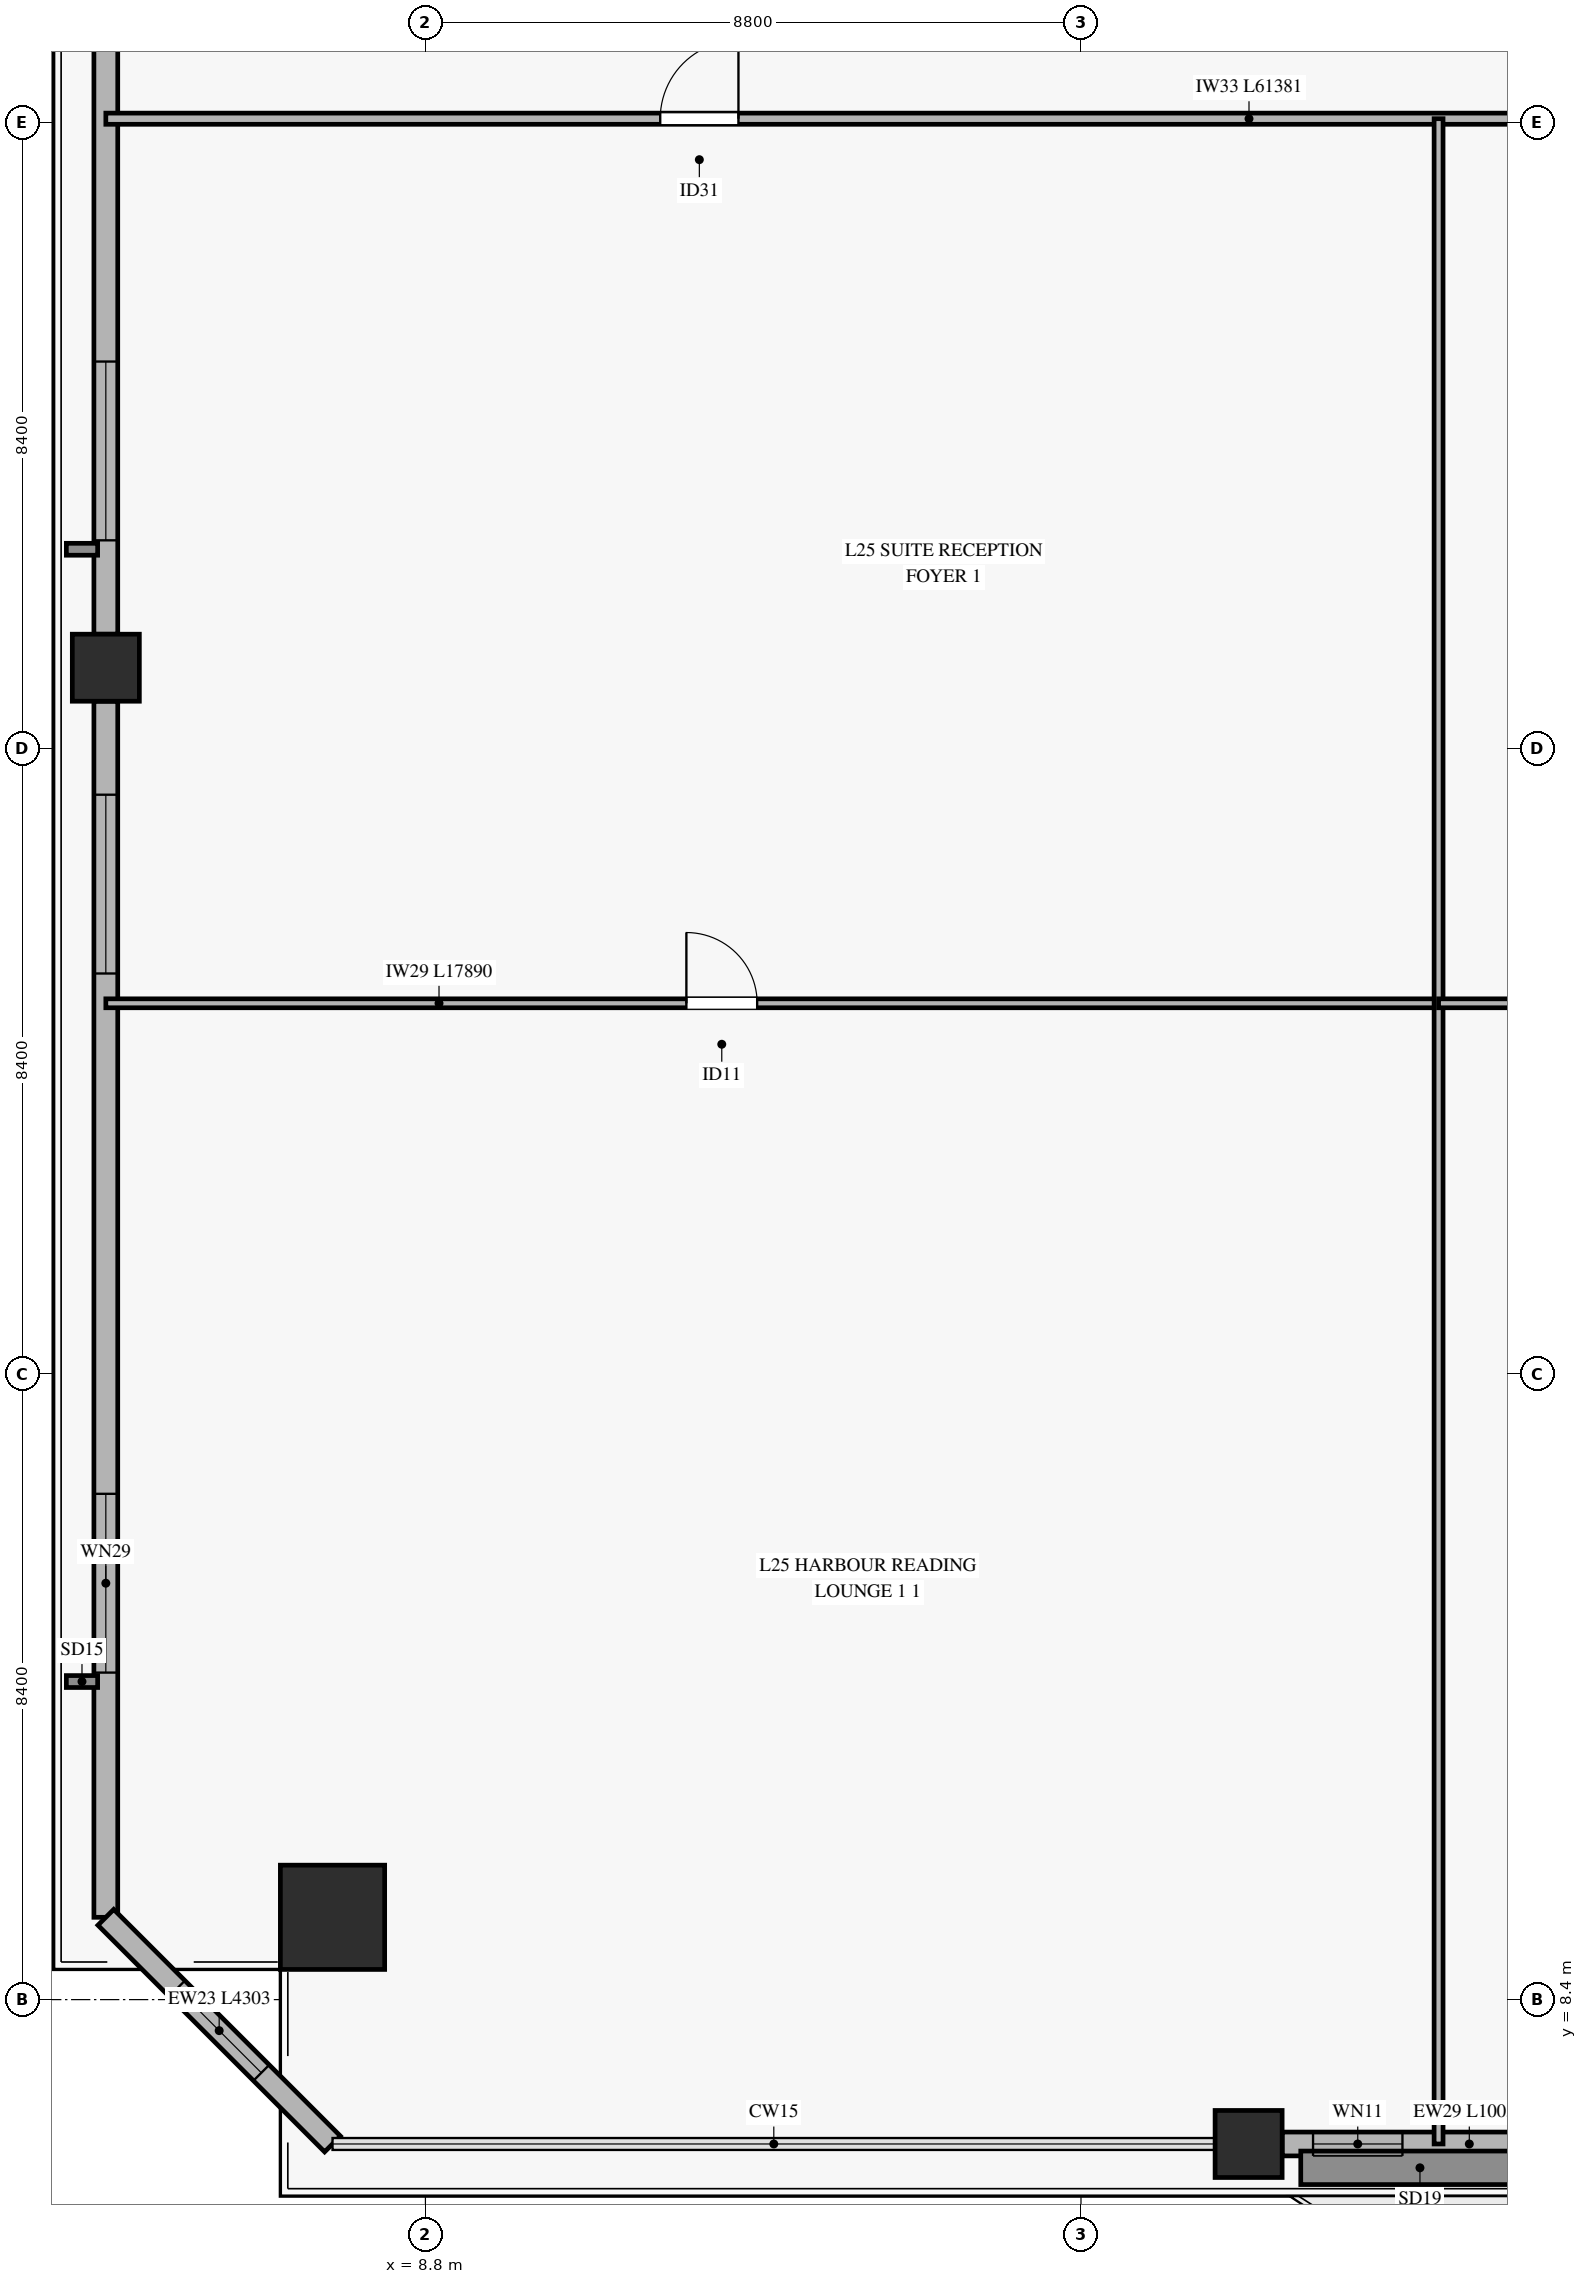
"""IFC4 building model, lengths in metres.
Left out: names, types, materials, properties, quantities, classifications, styles, units other than length and angle.
Written with IfcOpenShell. Run it as: python <this file> out.ifc"""

import sys

from ifc_helpers import new_model, si_unit, direction, frame, frame_2d, origin, origin_2d, place, context, subcontext, project, spatial, rectangle, hollow_rectangle, extrude, source, transform, mapped, element, fill, save


model = new_model("IFC4")
c1 = context("Model", 3, precision=1e-05, world=origin(), true_north=direction((0.0, 1.0)))
c2 = subcontext(c1, "Body", "Model", "MODEL_VIEW")
j1 = project(units=[si_unit("LENGTHUNIT", "METRE"), si_unit("PLANEANGLEUNIT", "RADIAN")], contexts=[c1])
p1 = place(None, origin())
s1 = spatial("IfcSite", under=j1, at=p1, CompositionType="ELEMENT")
p2 = place(p1, origin())
s2 = spatial("IfcBuilding", under=s1, at=p2, CompositionType="ELEMENT")
p3 = place(p2, frame((0.0, 0.0, 103.6)))
s3 = spatial("IfcBuildingStorey", under=s2, at=p3, CompositionType="ELEMENT", Elevation=103.6)
m1 = source(origin(), c2, "Body", "SweptSolid", [
    extrude(hollow_rectangle(XDim=1.4, YDim=1.4, WallThickness=0.065, at=origin_2d()), origin(), (0.0, 0.0, 1.0), 3.68),
])
p4 = place(p3, frame((7.553, 9.505, 0.0), z_axis=(0.0, 0.0, 1.0), x_axis=(1.0, 0.0, 0.0)))
e1 = element("IfcColumn", 1, at=p4, inside=s3, PredefinedType="COLUMN", context=c2, shape_type="MappedRepresentation", body=[
    mapped(m1, transform((0.0, 0.0, 0.0), x_axis=(1.0, 0.0, 0.0), y_axis=(0.0, 1.0, 0.0), z_axis=(0.0, 0.0, 1.0), scale=1.0)),
])
m2 = source(origin(), c2, "Body", "SweptSolid", [
    extrude(hollow_rectangle(XDim=0.9, YDim=0.9, WallThickness=0.04, at=origin_2d()), origin(), (0.0, 0.0, 1.0), 3.68),
])
for number, where, z_axis, x_axis in (
    (2, (19.85, 6.462, 0.0), (0.0, 0.0, 1.0), (1.0, 0.0, 0.0)),
    (3, (4.51, 26.28, 0.0), (0.0, 0.0, 1.0), (1.0, 0.0, 0.0)),
):
    element("IfcColumn", number, at=place(p3, frame(where, z_axis=z_axis, x_axis=x_axis)), inside=s3, PredefinedType="COLUMN", context=c2, shape_type="MappedRepresentation", body=[
        mapped(m2, transform((0.0, 0.0, 0.0), x_axis=(1.0, 0.0, 0.0), y_axis=(0.0, 1.0, 0.0), z_axis=(0.0, 0.0, 1.0), scale=1.0)),
    ])
p5 = place(p3, frame((20.3, 6.462, 0.0), z_axis=(0.0, 0.0, 1.0), x_axis=(1.0, 0.0, 0.0)))
e4 = element("IfcWall", 4, at=p5, inside=s3, PredefinedType="SOLIDWALL", context=c2, shape_type="SweptSolid", body=[
    extrude(rectangle(XDim=10.05, YDim=0.32, at=frame_2d((5.025, 0.0))), origin(), (0.0, 0.0, 1.0), 3.16),
])
p6 = place(p5, frame((4.1, 0.0, 0.0)))
e5 = element("IfcOpeningElement", 5, at=p6, cuts=e4, PredefinedType="OPENING", context=c2, shape_type="SweptSolid", body=[
    extrude(rectangle(XDim=1.8, YDim=2.25, at=frame_2d((0.9, 1.125))), frame((0.0, 0.17, 0.0), z_axis=(0.0, -1.0, 0.0), x_axis=(1.0, 0.0, 0.0)), (0.0, 0.0, 1.0), 0.34),
])
p7 = place(p5, frame((0.415, 0.0, 0.45)))
e6 = element("IfcOpeningElement", 6, at=p7, cuts=e4, PredefinedType="OPENING", context=c2, shape_type="SweptSolid", body=[
    extrude(rectangle(XDim=1.2, YDim=2.0, at=frame_2d((0.6, 1.0))), frame((0.0, 0.17, 0.0), z_axis=(0.0, -1.0, 0.0), x_axis=(1.0, 0.0, 0.0)), (0.0, 0.0, 1.0), 0.34),
])
p8 = place(p5, frame((6.9, 0.0, 0.45)))
e7 = element("IfcOpeningElement", 7, at=p8, cuts=e4, PredefinedType="OPENING", context=c2, shape_type="SweptSolid", body=[
    extrude(rectangle(XDim=1.6, YDim=2.0, at=frame_2d((0.8, 1.0))), frame((0.0, 0.17, 0.0), z_axis=(0.0, -1.0, 0.0), x_axis=(1.0, 0.0, 0.0)), (0.0, 0.0, 1.0), 0.34),
])
p9 = place(p3, frame((4.51, 9.505, 0.0), z_axis=(0.0, 0.0, 1.0), x_axis=(0.0, 1.0, 0.0)))
e8 = element("IfcWall", 8, at=p9, inside=s3, PredefinedType="SOLIDWALL", context=c2, shape_type="SweptSolid", body=[
    extrude(rectangle(XDim=16.325, YDim=0.32, at=frame_2d((8.163, 0.0))), origin(), (0.0, 0.0, 1.0), 3.16),
])
p10 = place(p9, frame((3.285, 0.0, 0.45)))
e9 = element("IfcOpeningElement", 9, at=p10, cuts=e8, PredefinedType="OPENING", context=c2, shape_type="SweptSolid", body=[
    extrude(rectangle(XDim=2.4, YDim=2.1, at=frame_2d((1.2, 1.05))), frame((0.0, 0.17, 0.0), z_axis=(0.0, -1.0, 0.0), x_axis=(1.0, 0.0, 0.0)), (0.0, 0.0, 1.0), 0.34),
])
p11 = place(p9, frame((12.67, 0.0, 0.45)))
e10 = element("IfcOpeningElement", 10, at=p11, cuts=e8, PredefinedType="OPENING", context=c2, shape_type="SweptSolid", body=[
    extrude(rectangle(XDim=2.4, YDim=2.1, at=frame_2d((1.2, 1.05))), frame((0.0, 0.17, 0.0), z_axis=(0.0, -1.0, 0.0), x_axis=(1.0, 0.0, 0.0)), (0.0, 0.0, 1.0), 0.34),
])
p12 = place(p3, frame((4.51, 26.73, 0.0), z_axis=(0.0, 0.0, 1.0), x_axis=(0.0, 1.0, 0.0)))
e11 = element("IfcWall", 11, at=p12, inside=s3, PredefinedType="SOLIDWALL", context=c2, shape_type="SweptSolid", body=[
    extrude(rectangle(XDim=16.326, YDim=0.32, at=frame_2d((8.163, 0.0))), origin(), (0.0, 0.0, 1.0), 3.16),
])
p13 = place(p12, frame((1.26, 0.0, 0.45)))
e12 = element("IfcOpeningElement", 12, at=p13, cuts=e11, PredefinedType="OPENING", context=c2, shape_type="SweptSolid", body=[
    extrude(rectangle(XDim=2.4, YDim=2.1, at=frame_2d((1.2, 1.05))), frame((0.0, 0.17, 0.0), z_axis=(0.0, -1.0, 0.0), x_axis=(1.0, 0.0, 0.0)), (0.0, 0.0, 1.0), 0.34),
])
p14 = place(p12, frame((12.574, 0.0, 0.45)))
e13 = element("IfcOpeningElement", 13, at=p14, cuts=e11, PredefinedType="OPENING", context=c2, shape_type="SweptSolid", body=[
    extrude(rectangle(XDim=2.4, YDim=2.1, at=frame_2d((1.2, 1.05))), frame((0.0, 0.17, 0.0), z_axis=(0.0, -1.0, 0.0), x_axis=(1.0, 0.0, 0.0)), (0.0, 0.0, 1.0), 0.34),
])
p15 = place(p3, frame((4.51, 9.505, 0.0), z_axis=(0.0, 0.0, 1.0), x_axis=(0.707106781187, -0.707106781187, 0.0)))
e14 = element("IfcWall", 14, at=p15, inside=s3, PredefinedType="SOLIDWALL", context=c2, shape_type="SweptSolid", body=[
    extrude(rectangle(XDim=4.303, YDim=0.3, at=frame_2d((2.152, 0.0))), origin(), (0.0, 0.0, 1.0), 3.16),
])
p16 = place(p15, frame((1.352, 0.0, 0.45)))
e15 = element("IfcOpeningElement", 15, at=p16, cuts=e14, PredefinedType="OPENING", context=c2, shape_type="SweptSolid", body=[
    extrude(rectangle(XDim=1.6, YDim=2.0, at=frame_2d((0.8, 1.0))), frame((0.0, 0.16, 0.0), z_axis=(0.0, -1.0, 0.0), x_axis=(1.0, 0.0, 0.0)), (0.0, 0.0, 1.0), 0.32),
])
p17 = place(p3, frame((4.51, 33.65, 0.0), z_axis=(0.0, 0.0, 1.0), x_axis=(1.0, 0.0, 0.0)))
e16 = element("IfcWall", 16, at=p17, inside=s3, PredefinedType="PARTITIONING", context=c2, shape_type="SweptSolid", body=[
    extrude(rectangle(XDim=61.381, YDim=0.15, at=frame_2d((30.69, 0.0))), origin(), (0.0, 0.0, 1.0), 2.765),
])
p18 = place(p17, frame((7.442, 0.0, 0.0)))
e17 = element("IfcOpeningElement", 17, at=p18, cuts=e16, PredefinedType="OPENING", context=c2, shape_type="SweptSolid", body=[
    extrude(rectangle(XDim=1.05, YDim=2.15, at=frame_2d((0.525, 1.075))), frame((0.0, 0.085, 0.0), z_axis=(0.0, -1.0, 0.0), x_axis=(1.0, 0.0, 0.0)), (0.0, 0.0, 1.0), 0.17),
])
p19 = place(p17, frame((20.776, 0.0, 0.0)))
e18 = element("IfcOpeningElement", 18, at=p19, cuts=e16, PredefinedType="OPENING", context=c2, shape_type="SweptSolid", body=[
    extrude(rectangle(XDim=1.05, YDim=2.15, at=frame_2d((0.525, 1.075))), frame((0.0, 0.085, 0.0), z_axis=(0.0, -1.0, 0.0), x_axis=(1.0, 0.0, 0.0)), (0.0, 0.0, 1.0), 0.17),
])
p20 = place(p17, frame((30.061, 0.0, 0.0)))
e19 = element("IfcOpeningElement", 19, at=p20, cuts=e16, PredefinedType="OPENING", context=c2, shape_type="SweptSolid", body=[
    extrude(rectangle(XDim=1.05, YDim=2.15, at=frame_2d((0.525, 1.075))), frame((0.0, 0.085, 0.0), z_axis=(0.0, -1.0, 0.0), x_axis=(1.0, 0.0, 0.0)), (0.0, 0.0, 1.0), 0.17),
])
p21 = place(p17, frame((47.371, 0.0, 0.0)))
e20 = element("IfcOpeningElement", 20, at=p21, cuts=e16, PredefinedType="OPENING", context=c2, shape_type="SweptSolid", body=[
    extrude(rectangle(XDim=1.05, YDim=2.15, at=frame_2d((0.525, 1.075))), frame((0.0, 0.085, 0.0), z_axis=(0.0, -1.0, 0.0), x_axis=(1.0, 0.0, 0.0)), (0.0, 0.0, 1.0), 0.17),
])
p22 = place(p3, frame((4.51, 21.775, 0.0), z_axis=(0.0, 0.0, 1.0), x_axis=(1.0, 0.0, 0.0)))
e21 = element("IfcWall", 21, at=p22, inside=s3, PredefinedType="PARTITIONING", context=c2, shape_type="SweptSolid", body=[
    extrude(rectangle(XDim=17.89, YDim=0.12, at=frame_2d((8.945, 0.0))), origin(), (0.0, 0.0, 1.0), 2.765),
])
p23 = place(p22, frame((7.793, 0.0, 0.0)))
e22 = element("IfcOpeningElement", 22, at=p23, cuts=e21, PredefinedType="OPENING", context=c2, shape_type="SweptSolid", body=[
    extrude(rectangle(XDim=0.95, YDim=2.1, at=frame_2d((0.475, 1.05))), frame((0.0, 0.07, 0.0), z_axis=(0.0, -1.0, 0.0), x_axis=(1.0, 0.0, 0.0)), (0.0, 0.0, 1.0), 0.14),
])
p24 = place(p3, frame((22.4, 6.462, 0.0), z_axis=(0.0, 0.0, 1.0), x_axis=(0.0, 1.0, 0.0)))
e23 = element("IfcWall", 23, at=p24, inside=s3, PredefinedType="PARTITIONING", context=c2, shape_type="SweptSolid", body=[
    extrude(rectangle(XDim=27.188, YDim=0.12, at=frame_2d((13.594, 0.0))), origin(), (0.0, 0.0, 1.0), 3.165),
])
p25 = place(p3, frame((22.4, 21.775, 0.0), z_axis=(0.0, 0.0, 1.0), x_axis=(1.0, 0.0, 0.0)))
e24 = element("IfcWall", 24, at=p25, inside=s3, PredefinedType="PARTITIONING", context=c2, shape_type="SweptSolid", body=[
    extrude(rectangle(XDim=6.8, YDim=0.12, at=frame_2d((3.4, 0.0))), origin(), (0.0, 0.0, 1.0), 3.215),
])
p26 = place(p25, frame((3.019, 0.0, 0.0)))
e25 = element("IfcOpeningElement", 25, at=p26, cuts=e24, PredefinedType="OPENING", context=c2, shape_type="SweptSolid", body=[
    extrude(rectangle(XDim=0.95, YDim=2.1, at=frame_2d((0.475, 1.05))), frame((0.0, 0.07, 0.0), z_axis=(0.0, -1.0, 0.0), x_axis=(1.0, 0.0, 0.0)), (0.0, 0.0, 1.0), 0.14),
])
m3 = source(origin(), c2, "Body", "SweptSolid", [
    extrude(rectangle(XDim=1.2, YDim=2.0, at=frame_2d((0.6, 1.0))), frame((0.0, 0.03, 0.0), z_axis=(0.0, -1.0, 0.0), x_axis=(1.0, 0.0, 0.0)), (0.0, 0.0, 1.0), 0.06),
])
p27 = place(p7, origin())
e26 = element("IfcWindow", 26, at=p27, inside=s3, PartitioningType="SINGLE_PANEL", PredefinedType="WINDOW", context=c2, shape_type="MappedRepresentation", body=[
    mapped(m3, transform((0.0, 0.0, 0.0), x_axis=(1.0, 0.0, 0.0), y_axis=(0.0, 1.0, 0.0), z_axis=(0.0, 0.0, 1.0), scale=1.0)),
])
fill(e6, e26)
m4 = source(origin(), c2, "Body", "SweptSolid", [
    extrude(rectangle(XDim=2.4, YDim=2.1, at=frame_2d((1.2, 1.05))), frame((0.0, 0.03, 0.0), z_axis=(0.0, -1.0, 0.0), x_axis=(1.0, 0.0, 0.0)), (0.0, 0.0, 1.0), 0.06),
])
p28 = place(p10, origin())
e27 = element("IfcWindow", 27, at=p28, inside=s3, PartitioningType="SINGLE_PANEL", PredefinedType="WINDOW", context=c2, shape_type="MappedRepresentation", body=[
    mapped(m4, transform((0.0, 0.0, 0.0), x_axis=(1.0, 0.0, 0.0), y_axis=(0.0, 1.0, 0.0), z_axis=(0.0, 0.0, 1.0), scale=1.0)),
])
fill(e9, e27)
p29 = place(p11, origin())
e28 = element("IfcWindow", 28, at=p29, inside=s3, PartitioningType="SINGLE_PANEL", PredefinedType="WINDOW", context=c2, shape_type="MappedRepresentation", body=[
    mapped(m4, transform((0.0, 0.0, 0.0), x_axis=(1.0, 0.0, 0.0), y_axis=(0.0, 1.0, 0.0), z_axis=(0.0, 0.0, 1.0), scale=1.0)),
])
fill(e10, e28)
p30 = place(p13, origin())
e29 = element("IfcWindow", 29, at=p30, inside=s3, PartitioningType="SINGLE_PANEL", PredefinedType="WINDOW", context=c2, shape_type="MappedRepresentation", body=[
    mapped(m4, transform((0.0, 0.0, 0.0), x_axis=(1.0, 0.0, 0.0), y_axis=(0.0, 1.0, 0.0), z_axis=(0.0, 0.0, 1.0), scale=1.0)),
])
fill(e12, e29)
m5 = source(origin(), c2, "Body", "SweptSolid", [
    extrude(rectangle(XDim=1.6, YDim=2.0, at=frame_2d((0.8, 1.0))), frame((0.0, 0.03, 0.0), z_axis=(0.0, -1.0, 0.0), x_axis=(1.0, 0.0, 0.0)), (0.0, 0.0, 1.0), 0.06),
])
p31 = place(p16, origin())
e30 = element("IfcWindow", 30, at=p31, inside=s3, PartitioningType="SINGLE_PANEL", PredefinedType="WINDOW", context=c2, shape_type="MappedRepresentation", body=[
    mapped(m5, transform((0.0, 0.0, 0.0), x_axis=(1.0, 0.0, 0.0), y_axis=(0.0, 1.0, 0.0), z_axis=(0.0, 0.0, 1.0), scale=1.0)),
])
fill(e15, e30)
m6 = source(origin(), c2, "Body", "SweptSolid", [
    extrude(rectangle(XDim=1.05, YDim=2.15, at=frame_2d((0.525, 1.075))), frame((0.0, 0.025, 0.0), z_axis=(0.0, -1.0, 0.0), x_axis=(1.0, 0.0, 0.0)), (0.0, 0.0, 1.0), 0.05),
])
p32 = place(p18, origin())
e31 = element("IfcDoor", 31, at=p32, inside=s3, OperationType="SINGLE_SWING_RIGHT", PredefinedType="DOOR", context=c2, shape_type="MappedRepresentation", body=[
    mapped(m6, transform((0.0, 0.0, 0.0), x_axis=(1.0, 0.0, 0.0), y_axis=(0.0, 1.0, 0.0), z_axis=(0.0, 0.0, 1.0), scale=1.0)),
])
fill(e17, e31)
m7 = source(origin(), c2, "Body", "SweptSolid", [
    extrude(rectangle(XDim=0.95, YDim=2.1, at=frame_2d((0.475, 1.05))), frame((0.0, 0.025, 0.0), z_axis=(0.0, -1.0, 0.0), x_axis=(1.0, 0.0, 0.0)), (0.0, 0.0, 1.0), 0.05),
])
p33 = place(p23, origin())
e32 = element("IfcDoor", 32, at=p33, inside=s3, OperationType="SINGLE_SWING_LEFT", PredefinedType="DOOR", context=c2, shape_type="MappedRepresentation", body=[
    mapped(m7, transform((0.0, 0.0, 0.0), x_axis=(1.0, 0.0, 0.0), y_axis=(0.0, 1.0, 0.0), z_axis=(0.0, 0.0, 1.0), scale=1.0)),
])
fill(e22, e32)
save(model, sys.argv[1])
